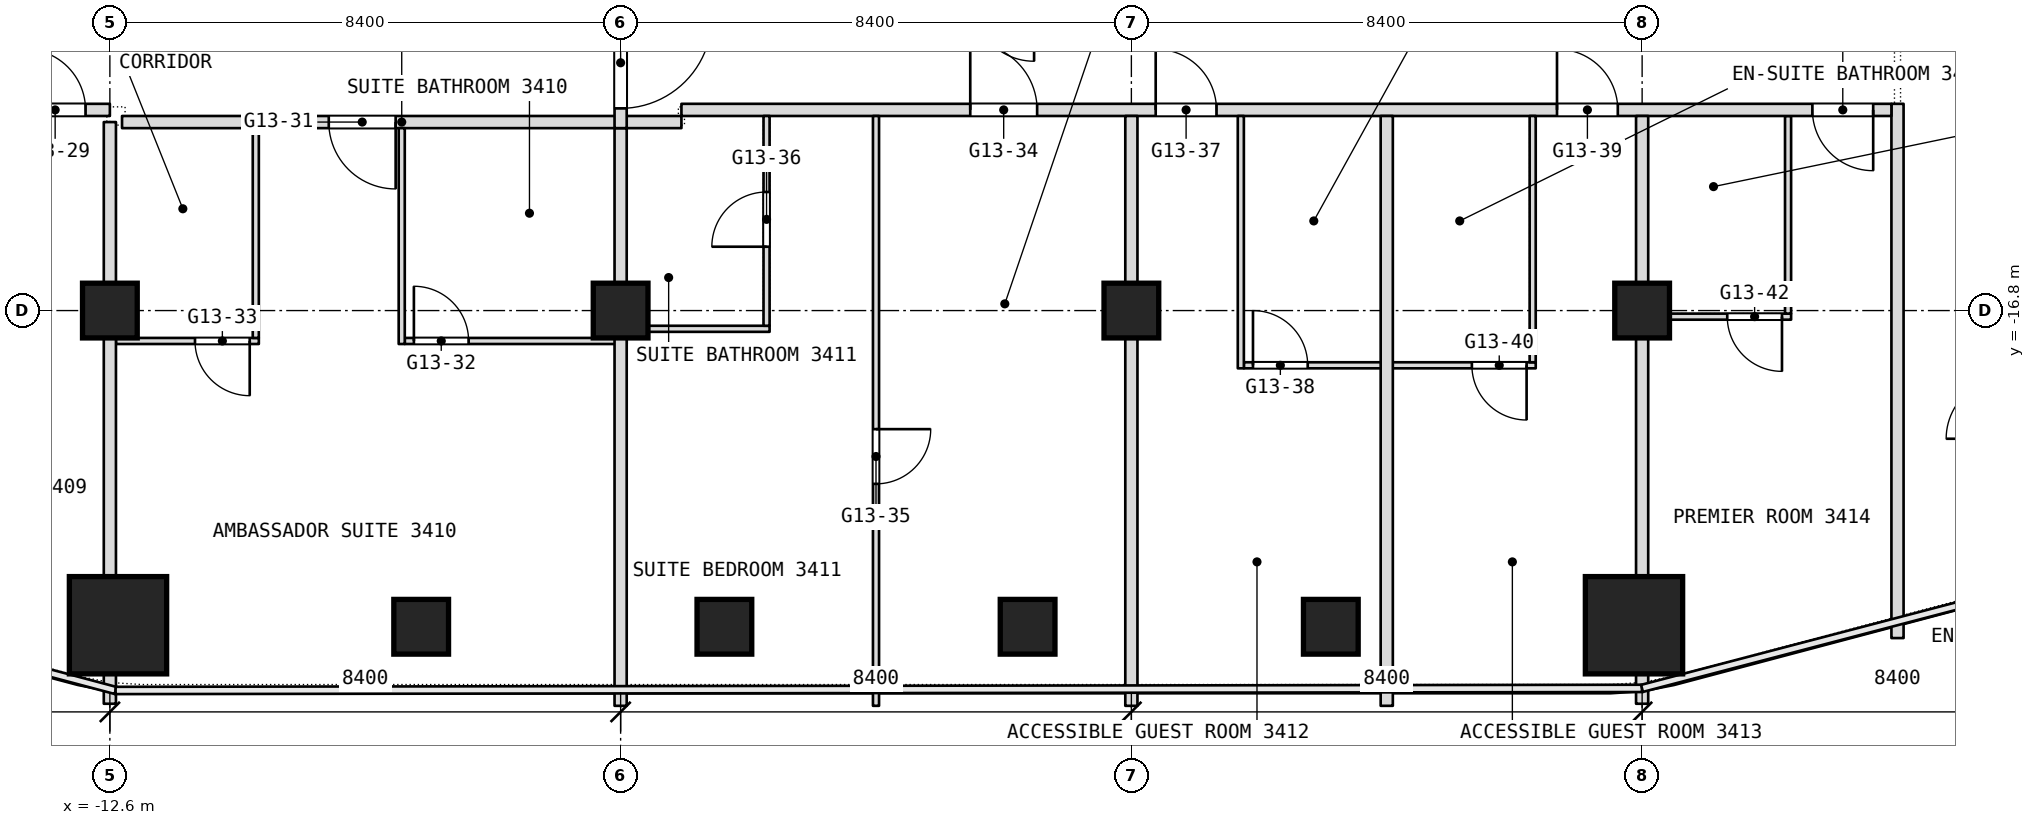
"""IFC4 building model, lengths in metres.
Left out: names, types, materials, properties, quantities, classifications, styles, units other than length and angle.
Written with IfcOpenShell. Run it as: python <this file> out.ifc"""

import sys

from ifc_helpers import new_model, si_unit, direction, frame, frame_2d, origin, origin_2d, place, context, subcontext, project, spatial, rectangle, extrude, element, fill, save


model = new_model("IFC4")
c1 = context("Model", 3, precision=1e-05, world=origin(), true_north=direction((0.0, 1.0)))
c2 = subcontext(c1, "Body", "Model", "MODEL_VIEW")
j1 = project(units=[si_unit("LENGTHUNIT", "METRE"), si_unit("PLANEANGLEUNIT", "RADIAN")], contexts=[c1])
p1 = place(None, origin())
s1 = spatial("IfcSite", under=j1, at=p1, CompositionType="ELEMENT")
p2 = place(p1, origin())
s2 = spatial("IfcBuilding", under=s1, at=p2, CompositionType="ELEMENT")
p3 = place(p2, frame((0.0, 0.0, 148.1)))
s3 = spatial("IfcBuildingStorey", under=s2, at=p3, CompositionType="ELEMENT", Elevation=148.1)
for number, where, z_axis, x_axis in (
    (1, (-12.466, -21.975, 0.0), (0.0, 0.0, 1.0), (1.0, 0.0, 0.0)),
    (2, (12.466, -21.975, 0.0), (0.0, 0.0, 1.0), (1.0, 0.0, 0.0)),
):
    element("IfcColumn", number, at=place(p3, frame(where, z_axis=z_axis, x_axis=x_axis)), inside=s3, PredefinedType="COLUMN", context=c2, shape_type="SweptSolid", body=[
        extrude(rectangle(XDim=1.6, YDim=1.6, at=origin_2d()), origin(), (0.0, 0.0, 1.0), 3.6),
    ])
for number, where, z_axis, x_axis in (
    (3, (-12.6, -16.8, 0.0), (0.0, 0.0, 1.0), (1.0, 0.0, 0.0)),
    (4, (-4.2, -16.8, 0.0), (0.0, 0.0, 1.0), (1.0, 0.0, 0.0)),
    (5, (4.2, -16.8, 0.0), (0.0, 0.0, 1.0), (1.0, 0.0, 0.0)),
    (6, (12.6, -16.8, 0.0), (0.0, 0.0, 1.0), (1.0, 0.0, 0.0)),
    (7, (7.48, -22.0, 0.0), (0.0, 0.0, 1.0), (1.0, 0.0, 0.0)),
    (8, (2.493, -22.0, 0.0), (0.0, 0.0, 1.0), (1.0, 0.0, 0.0)),
    (9, (-2.493, -22.0, 0.0), (0.0, 0.0, 1.0), (1.0, 0.0, 0.0)),
    (10, (-7.48, -22.0, 0.0), (0.0, 0.0, 1.0), (1.0, 0.0, 0.0)),
):
    element("IfcColumn", number, at=place(p3, frame(where, z_axis=z_axis, x_axis=x_axis)), inside=s3, PredefinedType="COLUMN", context=c2, shape_type="SweptSolid", body=[
        extrude(rectangle(XDim=0.9, YDim=0.9, at=origin_2d()), origin(), (0.0, 0.0, 1.0), 3.6),
    ])
p4 = place(p3, frame((6.05, -17.7, 0.0), z_axis=(0.0, 0.0, 1.0), x_axis=(1.0, 0.0, 0.0)))
e11 = element("IfcWall", 11, at=p4, inside=s3, PredefinedType="PARTITIONING", context=c2, shape_type="SweptSolid", body=[
    extrude(rectangle(XDim=4.8, YDim=0.1, at=frame_2d((2.4, 0.0))), origin(), (0.0, 0.0, 1.0), 3.34),
])
p5 = place(p4, frame((0.15, 0.0, 0.0)))
e12 = element("IfcOpeningElement", 12, at=p5, cuts=e11, PredefinedType="OPENING", context=c2, shape_type="SweptSolid", body=[
    extrude(rectangle(XDim=0.9, YDim=2.1, at=frame_2d((0.45, 1.05))), frame((0.0, 0.05, 0.0), z_axis=(0.0, -1.0, 0.0), x_axis=(1.0, 0.0, 0.0)), (0.0, 0.0, 1.0), 0.1),
])
p6 = place(p4, frame((3.75, 0.0, 0.0)))
e13 = element("IfcOpeningElement", 13, at=p6, cuts=e11, PredefinedType="OPENING", context=c2, shape_type="SweptSolid", body=[
    extrude(rectangle(XDim=0.9, YDim=2.1, at=frame_2d((0.45, 1.05))), frame((0.0, 0.05, 0.0), z_axis=(0.0, -1.0, 0.0), x_axis=(1.0, 0.0, 0.0)), (0.0, 0.0, 1.0), 0.1),
])
p7 = place(p3, frame((-12.5, -17.3, 0.0), z_axis=(0.0, 0.0, 1.0), x_axis=(1.0, 0.0, 0.0)))
e14 = element("IfcWall", 14, at=p7, inside=s3, PredefinedType="PARTITIONING", context=c2, shape_type="SweptSolid", body=[
    extrude(rectangle(XDim=2.35, YDim=0.1, at=frame_2d((1.175, 0.0))), origin(), (0.0, 0.0, 1.0), 3.34),
])
p8 = place(p7, frame((1.3, 0.0, 0.0)))
e15 = element("IfcOpeningElement", 15, at=p8, cuts=e14, PredefinedType="OPENING", context=c2, shape_type="SweptSolid", body=[
    extrude(rectangle(XDim=0.9, YDim=2.1, at=frame_2d((0.45, 1.05))), frame((0.0, 0.05, 0.0), z_axis=(0.0, -1.0, 0.0), x_axis=(1.0, 0.0, 0.0)), (0.0, 0.0, 1.0), 0.1),
])
p9 = place(p3, frame((-7.75, -17.3, 0.0), z_axis=(0.0, 0.0, 1.0), x_axis=(1.0, 0.0, 0.0)))
e16 = element("IfcWall", 16, at=p9, inside=s3, PredefinedType="PARTITIONING", context=c2, shape_type="SweptSolid", body=[
    extrude(rectangle(XDim=3.65, YDim=0.1, at=frame_2d((1.825, 0.0))), origin(), (0.0, 0.0, 1.0), 3.34),
])
p10 = place(p9, frame((0.15, 0.0, 0.0)))
e17 = element("IfcOpeningElement", 17, at=p10, cuts=e16, PredefinedType="OPENING", context=c2, shape_type="SweptSolid", body=[
    extrude(rectangle(XDim=0.9, YDim=2.1, at=frame_2d((0.45, 1.05))), frame((0.0, 0.05, 0.0), z_axis=(0.0, -1.0, 0.0), x_axis=(1.0, 0.0, 0.0)), (0.0, 0.0, 1.0), 0.1),
])
p11 = place(p3, frame((-4.1, -17.1, 0.0), z_axis=(0.0, 0.0, 1.0), x_axis=(1.0, 0.0, 0.0)))
e18 = element("IfcWall", 18, at=p11, inside=s3, PredefinedType="PARTITIONING", context=c2, shape_type="SweptSolid", body=[
    extrude(rectangle(XDim=2.35, YDim=0.1, at=frame_2d((1.175, 0.0))), origin(), (0.0, 0.0, 1.0), 3.34),
])
p12 = place(p3, frame((12.7, -16.9, 0.0), z_axis=(0.0, 0.0, 1.0), x_axis=(1.0, 0.0, 0.0)))
e19 = element("IfcWall", 19, at=p12, inside=s3, PredefinedType="PARTITIONING", context=c2, shape_type="SweptSolid", body=[
    extrude(rectangle(XDim=2.35, YDim=0.1, at=frame_2d((1.175, 0.0))), origin(), (0.0, 0.0, 1.0), 2.89),
])
p13 = place(p12, frame((1.3, 0.0, 0.0)))
e20 = element("IfcOpeningElement", 20, at=p13, cuts=e19, PredefinedType="OPENING", context=c2, shape_type="SweptSolid", body=[
    extrude(rectangle(XDim=0.9, YDim=2.1, at=frame_2d((0.45, 1.05))), frame((0.0, 0.05, 0.0), z_axis=(0.0, -1.0, 0.0), x_axis=(1.0, 0.0, 0.0)), (0.0, 0.0, 1.0), 0.1),
])
p14 = place(p3, frame((16.8, -22.186, 0.0), z_axis=(0.0, 0.0, 1.0), x_axis=(0.0, 1.0, 0.0)))
e21 = element("IfcWall", 21, at=p14, inside=s3, PredefinedType="PARTITIONING", context=c2, shape_type="SweptSolid", body=[
    extrude(rectangle(XDim=8.786, YDim=0.2, at=frame_2d((4.393, 0.0))), origin(), (0.0, 0.0, 1.0), 3.34),
])
p15 = place(p3, frame((15.0, -16.85, 0.0), z_axis=(0.0, 0.0, 1.0), x_axis=(0.0, 1.0, 0.0)))
e22 = element("IfcWall", 22, at=p15, inside=s3, PredefinedType="PARTITIONING", context=c2, shape_type="SweptSolid", body=[
    extrude(rectangle(XDim=3.25, YDim=0.1, at=frame_2d((1.625, 0.0))), origin(), (0.0, 0.0, 1.0), 3.34),
])
p16 = place(p3, frame((-12.4, -13.7, 0.0), z_axis=(0.0, 0.0, 1.0), x_axis=(1.0, 0.0, 0.0)))
e23 = element("IfcWall", 23, at=p16, inside=s3, PredefinedType="PARTITIONING", context=c2, shape_type="SweptSolid", body=[
    extrude(rectangle(XDim=9.2, YDim=0.2, at=frame_2d((4.6, 0.0))), origin(), (0.0, 0.0, 1.0), 3.34),
])
p17 = place(p16, frame((3.4, 0.0, 0.0)))
e24 = element("IfcOpeningElement", 24, at=p17, cuts=e23, PredefinedType="OPENING", context=c2, shape_type="SweptSolid", body=[
    extrude(rectangle(XDim=1.1, YDim=2.1, at=frame_2d((0.55, 1.05))), frame((0.0, 0.1, 0.0), z_axis=(0.0, -1.0, 0.0), x_axis=(1.0, 0.0, 0.0)), (0.0, 0.0, 1.0), 0.2),
])
p18 = place(p3, frame((-16.7, -13.5, 0.0), z_axis=(0.0, 0.0, 1.0), x_axis=(1.0, 0.0, 0.0)))
e25 = element("IfcWall", 25, at=p18, inside=s3, PredefinedType="PARTITIONING", context=c2, shape_type="SweptSolid", body=[
    extrude(rectangle(XDim=4.1, YDim=0.2, at=frame_2d((2.05, 0.0))), origin(), (0.0, 0.0, 1.0), 3.34),
])
p19 = place(p18, frame((2.7, 0.0, 0.0)))
e26 = element("IfcOpeningElement", 26, at=p19, cuts=e25, PredefinedType="OPENING", context=c2, shape_type="SweptSolid", body=[
    extrude(rectangle(XDim=1.0, YDim=2.1, at=frame_2d((0.5, 1.05))), frame((0.0, 0.1, 0.0), z_axis=(0.0, -1.0, 0.0), x_axis=(1.0, 0.0, 0.0)), (0.0, 0.0, 1.0), 0.2),
])
p20 = place(p3, frame((-3.2, -13.5, 0.0), z_axis=(0.0, 0.0, 1.0), x_axis=(1.0, 0.0, 0.0)))
e27 = element("IfcWall", 27, at=p20, inside=s3, PredefinedType="PARTITIONING", context=c2, shape_type="SweptSolid", body=[
    extrude(rectangle(XDim=19.9, YDim=0.2, at=frame_2d((9.95, 0.0))), origin(), (0.0, 0.0, 1.0), 3.34),
])
p21 = place(p20, frame((4.75, 0.0, 0.0)))
e28 = element("IfcOpeningElement", 28, at=p21, cuts=e27, PredefinedType="OPENING", context=c2, shape_type="SweptSolid", body=[
    extrude(rectangle(XDim=1.1, YDim=2.1, at=frame_2d((0.55, 1.05))), frame((0.0, 0.1, 0.0), z_axis=(0.0, -1.0, 0.0), x_axis=(1.0, 0.0, 0.0)), (0.0, 0.0, 1.0), 0.2),
])
p22 = place(p20, frame((7.8, 0.0, 0.0)))
e29 = element("IfcOpeningElement", 29, at=p22, cuts=e27, PredefinedType="OPENING", context=c2, shape_type="SweptSolid", body=[
    extrude(rectangle(XDim=1.0, YDim=2.1, at=frame_2d((0.5, 1.05))), frame((0.0, 0.1, 0.0), z_axis=(0.0, -1.0, 0.0), x_axis=(1.0, 0.0, 0.0)), (0.0, 0.0, 1.0), 0.2),
])
p23 = place(p20, frame((14.4, 0.0, 0.0)))
e30 = element("IfcOpeningElement", 30, at=p23, cuts=e27, PredefinedType="OPENING", context=c2, shape_type="SweptSolid", body=[
    extrude(rectangle(XDim=1.0, YDim=2.1, at=frame_2d((0.5, 1.05))), frame((0.0, 0.1, 0.0), z_axis=(0.0, -1.0, 0.0), x_axis=(1.0, 0.0, 0.0)), (0.0, 0.0, 1.0), 0.2),
])
p24 = place(p20, frame((18.6, 0.0, 0.0)))
e31 = element("IfcOpeningElement", 31, at=p24, cuts=e27, PredefinedType="OPENING", context=c2, shape_type="SweptSolid", body=[
    extrude(rectangle(XDim=1.0, YDim=2.1, at=frame_2d((0.5, 1.05))), frame((0.0, 0.1, 0.0), z_axis=(0.0, -1.0, 0.0), x_axis=(1.0, 0.0, 0.0)), (0.0, 0.0, 1.0), 0.2),
])
p25 = place(p3, frame((12.6, -23.266, 0.0), z_axis=(0.0, 0.0, 1.0), x_axis=(0.0, 1.0, 0.0)))
e32 = element("IfcWall", 32, at=p25, inside=s3, PredefinedType="PARTITIONING", context=c2, shape_type="SweptSolid", body=[
    extrude(rectangle(XDim=0.491, YDim=0.2, at=frame_2d((0.246, 0.0))), origin(), (0.0, 0.0, 1.0), 3.34),
])
p26 = place(p3, frame((12.6, -21.175, 0.0), z_axis=(0.0, 0.0, 1.0), x_axis=(0.0, 1.0, 0.0)))
e33 = element("IfcWall", 33, at=p26, inside=s3, PredefinedType="PARTITIONING", context=c2, shape_type="SweptSolid", body=[
    extrude(rectangle(XDim=7.575, YDim=0.2, at=frame_2d((3.788, 0.0))), origin(), (0.0, 0.0, 1.0), 3.34),
])
p27 = place(p3, frame((10.8, -17.65, 0.0), z_axis=(0.0, 0.0, 1.0), x_axis=(0.0, 1.0, 0.0)))
e34 = element("IfcWall", 34, at=p27, inside=s3, PredefinedType="PARTITIONING", context=c2, shape_type="SweptSolid", body=[
    extrude(rectangle(XDim=4.05, YDim=0.1, at=frame_2d((2.025, 0.0))), origin(), (0.0, 0.0, 1.0), 3.34),
])
p28 = place(p3, frame((8.4, -23.3, 0.0), z_axis=(0.0, 0.0, 1.0), x_axis=(0.0, 1.0, 0.0)))
e35 = element("IfcWall", 35, at=p28, inside=s3, PredefinedType="PARTITIONING", context=c2, shape_type="SweptSolid", body=[
    extrude(rectangle(XDim=9.7, YDim=0.2, at=frame_2d((4.85, 0.0))), origin(), (0.0, 0.0, 1.0), 3.34),
])
p29 = place(p3, frame((6.0, -17.75, 0.0), z_axis=(0.0, 0.0, 1.0), x_axis=(0.0, 1.0, 0.0)))
e36 = element("IfcWall", 36, at=p29, inside=s3, PredefinedType="PARTITIONING", context=c2, shape_type="SweptSolid", body=[
    extrude(rectangle(XDim=4.15, YDim=0.1, at=frame_2d((2.075, 0.0))), origin(), (0.0, 0.0, 1.0), 3.34),
])
p30 = place(p3, frame((4.2, -23.3, 0.0), z_axis=(0.0, 0.0, 1.0), x_axis=(0.0, 1.0, 0.0)))
e37 = element("IfcWall", 37, at=p30, inside=s3, PredefinedType="PARTITIONING", context=c2, shape_type="SweptSolid", body=[
    extrude(rectangle(XDim=9.7, YDim=0.2, at=frame_2d((4.85, 0.0))), origin(), (0.0, 0.0, 1.0), 3.34),
])
p31 = place(p3, frame((0.0, -23.3, 0.0), z_axis=(0.0, 0.0, 1.0), x_axis=(0.0, 1.0, 0.0)))
e38 = element("IfcWall", 38, at=p31, inside=s3, PredefinedType="PARTITIONING", context=c2, shape_type="SweptSolid", body=[
    extrude(rectangle(XDim=9.7, YDim=0.1, at=frame_2d((4.85, 0.0))), origin(), (0.0, 0.0, 1.0), 3.34),
])
p32 = place(p31, frame((3.65, 0.0, 0.0)))
e39 = element("IfcOpeningElement", 39, at=p32, cuts=e38, PredefinedType="OPENING", context=c2, shape_type="SweptSolid", body=[
    extrude(rectangle(XDim=0.9, YDim=2.1, at=frame_2d((0.45, 1.05))), frame((0.0, 0.05, 0.0), z_axis=(0.0, -1.0, 0.0), x_axis=(1.0, 0.0, 0.0)), (0.0, 0.0, 1.0), 0.1),
])
p33 = place(p3, frame((-1.8, -17.05, 0.0), z_axis=(0.0, 0.0, 1.0), x_axis=(0.0, 1.0, 0.0)))
e40 = element("IfcWall", 40, at=p33, inside=s3, PredefinedType="PARTITIONING", context=c2, shape_type="SweptSolid", body=[
    extrude(rectangle(XDim=3.45, YDim=0.1, at=frame_2d((1.725, 0.0))), origin(), (0.0, 0.0, 1.0), 3.34),
])
p34 = place(p33, frame((1.3, 0.0, 0.0)))
e41 = element("IfcOpeningElement", 41, at=p34, cuts=e40, PredefinedType="OPENING", context=c2, shape_type="SweptSolid", body=[
    extrude(rectangle(XDim=0.9, YDim=2.1, at=frame_2d((0.45, 1.05))), frame((0.0, 0.05, 0.0), z_axis=(0.0, -1.0, 0.0), x_axis=(1.0, 0.0, 0.0)), (0.0, 0.0, 1.0), 0.1),
])
p35 = place(p3, frame((-4.2, -23.3, 0.0), z_axis=(0.0, 0.0, 1.0), x_axis=(0.0, 1.0, 0.0)))
e42 = element("IfcWall", 42, at=p35, inside=s3, PredefinedType="PARTITIONING", context=c2, shape_type="SweptSolid", body=[
    extrude(rectangle(XDim=9.5, YDim=0.2, at=frame_2d((4.75, 0.0))), origin(), (0.0, 0.0, 1.0), 3.34),
])
p36 = place(p3, frame((-4.2, -13.8, 0.0), z_axis=(0.0, 0.0, 1.0), x_axis=(0.0, 1.0, 0.0)))
e43 = element("IfcWall", 43, at=p36, inside=s3, PredefinedType="PARTITIONING", context=c2, shape_type="SweptSolid", body=[
    extrude(rectangle(XDim=13.8, YDim=0.2, at=frame_2d((6.9, 0.0))), origin(), (0.0, 0.0, 1.0), 3.34),
])
p37 = place(p36, frame((12.15, 0.0, 0.0)))
e44 = element("IfcOpeningElement", 44, at=p37, cuts=e43, PredefinedType="OPENING", context=c2, shape_type="SweptSolid", body=[
    extrude(rectangle(XDim=1.5, YDim=2.1, at=frame_2d((0.75, 1.05))), frame((0.0, 0.1, 0.0), z_axis=(0.0, -1.0, 0.0), x_axis=(1.0, 0.0, 0.0)), (0.0, 0.0, 1.0), 0.2),
])
p38 = place(p36, frame((0.325, 0.0, 0.0)))
e45 = element("IfcOpeningElement", 45, at=p38, cuts=e43, PredefinedType="OPENING", context=c2, shape_type="SweptSolid", body=[
    extrude(rectangle(XDim=1.5, YDim=2.1, at=frame_2d((0.75, 1.05))), frame((0.0, 0.1, 0.0), z_axis=(0.0, -1.0, 0.0), x_axis=(1.0, 0.0, 0.0)), (0.0, 0.0, 1.0), 0.2),
])
p39 = place(p3, frame((-7.8, -17.35, 0.0), z_axis=(0.0, 0.0, 1.0), x_axis=(0.0, 1.0, 0.0)))
e46 = element("IfcWall", 46, at=p39, inside=s3, PredefinedType="PARTITIONING", context=c2, shape_type="SweptSolid", body=[
    extrude(rectangle(XDim=3.55, YDim=0.1, at=frame_2d((1.775, 0.0))), origin(), (0.0, 0.0, 1.0), 3.34),
])
p40 = place(p3, frame((-10.2, -17.25, 0.0), z_axis=(0.0, 0.0, 1.0), x_axis=(0.0, 1.0, 0.0)))
e47 = element("IfcWall", 47, at=p40, inside=s3, PredefinedType="PARTITIONING", context=c2, shape_type="SweptSolid", body=[
    extrude(rectangle(XDim=3.45, YDim=0.1, at=frame_2d((1.725, 0.0))), origin(), (0.0, 0.0, 1.0), 3.34),
])
p41 = place(p3, frame((-12.6, -23.266, 0.0), z_axis=(0.0, 0.0, 1.0), x_axis=(0.0, 1.0, 0.0)))
e48 = element("IfcWall", 48, at=p41, inside=s3, PredefinedType="PARTITIONING", context=c2, shape_type="SweptSolid", body=[
    extrude(rectangle(XDim=0.491, YDim=0.2, at=frame_2d((0.246, 0.0))), origin(), (0.0, 0.0, 1.0), 3.34),
])
p42 = place(p3, frame((-12.6, -21.175, 0.0), z_axis=(0.0, 0.0, 1.0), x_axis=(0.0, 1.0, 0.0)))
e49 = element("IfcWall", 49, at=p42, inside=s3, PredefinedType="PARTITIONING", context=c2, shape_type="SweptSolid", body=[
    extrude(rectangle(XDim=7.475, YDim=0.2, at=frame_2d((3.738, 0.0))), origin(), (0.0, 0.0, 1.0), 3.34),
])
p43 = place(p5, origin())
e50 = element("IfcDoor", 50, at=p43, inside=s3, OperationType="SINGLE_SWING_LEFT", PredefinedType="DOOR", context=c2, shape_type="SweptSolid", body=[
    extrude(rectangle(XDim=0.9, YDim=2.1, at=frame_2d((0.45, 1.05))), frame((0.0, 0.025, 0.0), z_axis=(0.0, -1.0, 0.0), x_axis=(1.0, 0.0, 0.0)), (0.0, 0.0, 1.0), 0.05),
])
fill(e12, e50)
p44 = place(p6, origin())
e51 = element("IfcDoor", 51, at=p44, inside=s3, OperationType="SINGLE_SWING_RIGHT", PredefinedType="DOOR", context=c2, shape_type="SweptSolid", body=[
    extrude(rectangle(XDim=0.9, YDim=2.1, at=frame_2d((0.45, 1.05))), frame((0.0, 0.025, 0.0), z_axis=(0.0, -1.0, 0.0), x_axis=(1.0, 0.0, 0.0)), (0.0, 0.0, 1.0), 0.05),
])
fill(e13, e51)
p45 = place(p8, origin())
e52 = element("IfcDoor", 52, at=p45, inside=s3, OperationType="SINGLE_SWING_RIGHT", PredefinedType="DOOR", context=c2, shape_type="SweptSolid", body=[
    extrude(rectangle(XDim=0.9, YDim=2.1, at=frame_2d((0.45, 1.05))), frame((0.0, 0.025, 0.0), z_axis=(0.0, -1.0, 0.0), x_axis=(1.0, 0.0, 0.0)), (0.0, 0.0, 1.0), 0.05),
])
fill(e15, e52)
p46 = place(p10, origin())
e53 = element("IfcDoor", 53, at=p46, inside=s3, OperationType="SINGLE_SWING_LEFT", PredefinedType="DOOR", context=c2, shape_type="SweptSolid", body=[
    extrude(rectangle(XDim=0.9, YDim=2.1, at=frame_2d((0.45, 1.05))), frame((0.0, 0.025, 0.0), z_axis=(0.0, -1.0, 0.0), x_axis=(1.0, 0.0, 0.0)), (0.0, 0.0, 1.0), 0.05),
])
fill(e17, e53)
p47 = place(p13, origin())
e54 = element("IfcDoor", 54, at=p47, inside=s3, OperationType="SINGLE_SWING_RIGHT", PredefinedType="DOOR", context=c2, shape_type="SweptSolid", body=[
    extrude(rectangle(XDim=0.9, YDim=2.1, at=frame_2d((0.45, 1.05))), frame((0.0, 0.025, 0.0), z_axis=(0.0, -1.0, 0.0), x_axis=(1.0, 0.0, 0.0)), (0.0, 0.0, 1.0), 0.05),
])
fill(e20, e54)
p48 = place(p17, origin())
e55 = element("IfcDoor", 55, at=p48, inside=s3, OperationType="SINGLE_SWING_LEFT", PredefinedType="DOOR", context=c2, shape_type="SweptSolid", body=[
    extrude(rectangle(XDim=1.1, YDim=2.1, at=frame_2d((0.55, 1.05))), frame((0.0, 0.025, 0.0), z_axis=(0.0, -1.0, 0.0), x_axis=(1.0, 0.0, 0.0)), (0.0, 0.0, 1.0), 0.05),
])
fill(e24, e55)
p49 = place(p19, origin())
e56 = element("IfcDoor", 56, at=p49, inside=s3, OperationType="SINGLE_SWING_LEFT", PredefinedType="DOOR", context=c2, shape_type="SweptSolid", body=[
    extrude(rectangle(XDim=1.0, YDim=2.1, at=frame_2d((0.5, 1.05))), frame((0.0, 0.025, 0.0), z_axis=(0.0, -1.0, 0.0), x_axis=(1.0, 0.0, 0.0)), (0.0, 0.0, 1.0), 0.05),
])
fill(e26, e56)
p50 = place(p21, origin())
e57 = element("IfcDoor", 57, at=p50, inside=s3, OperationType="SINGLE_SWING_RIGHT", PredefinedType="DOOR", context=c2, shape_type="SweptSolid", body=[
    extrude(rectangle(XDim=1.1, YDim=2.1, at=frame_2d((0.55, 1.05))), frame((0.0, 0.025, 0.0), z_axis=(0.0, -1.0, 0.0), x_axis=(1.0, 0.0, 0.0)), (0.0, 0.0, 1.0), 0.05),
])
fill(e28, e57)
p51 = place(p22, origin())
e58 = element("IfcDoor", 58, at=p51, inside=s3, OperationType="SINGLE_SWING_LEFT", PredefinedType="DOOR", context=c2, shape_type="SweptSolid", body=[
    extrude(rectangle(XDim=1.0, YDim=2.1, at=frame_2d((0.5, 1.05))), frame((0.0, 0.025, 0.0), z_axis=(0.0, -1.0, 0.0), x_axis=(1.0, 0.0, 0.0)), (0.0, 0.0, 1.0), 0.05),
])
fill(e29, e58)
p52 = place(p23, origin())
e59 = element("IfcDoor", 59, at=p52, inside=s3, OperationType="SINGLE_SWING_LEFT", PredefinedType="DOOR", context=c2, shape_type="SweptSolid", body=[
    extrude(rectangle(XDim=1.0, YDim=2.1, at=frame_2d((0.5, 1.05))), frame((0.0, 0.025, 0.0), z_axis=(0.0, -1.0, 0.0), x_axis=(1.0, 0.0, 0.0)), (0.0, 0.0, 1.0), 0.05),
])
fill(e30, e59)
p53 = place(p24, origin())
e60 = element("IfcDoor", 60, at=p53, inside=s3, OperationType="SINGLE_SWING_LEFT", PredefinedType="DOOR", context=c2, shape_type="SweptSolid", body=[
    extrude(rectangle(XDim=1.0, YDim=2.1, at=frame_2d((0.5, 1.05))), frame((0.0, 0.025, 0.0), z_axis=(0.0, -1.0, 0.0), x_axis=(1.0, 0.0, 0.0)), (0.0, 0.0, 1.0), 0.05),
])
fill(e31, e60)
p54 = place(p32, origin())
e61 = element("IfcDoor", 61, at=p54, inside=s3, OperationType="SINGLE_SWING_RIGHT", PredefinedType="DOOR", context=c2, shape_type="SweptSolid", body=[
    extrude(rectangle(XDim=0.9, YDim=2.1, at=frame_2d((0.45, 1.05))), frame((0.0, 0.025, 0.0), z_axis=(0.0, -1.0, 0.0), x_axis=(1.0, 0.0, 0.0)), (0.0, 0.0, 1.0), 0.05),
])
fill(e39, e61)
p55 = place(p34, origin())
e62 = element("IfcDoor", 62, at=p55, inside=s3, OperationType="SINGLE_SWING_LEFT", PredefinedType="DOOR", context=c2, shape_type="SweptSolid", body=[
    extrude(rectangle(XDim=0.9, YDim=2.1, at=frame_2d((0.45, 1.05))), frame((0.0, 0.025, 0.0), z_axis=(0.0, -1.0, 0.0), x_axis=(1.0, 0.0, 0.0)), (0.0, 0.0, 1.0), 0.05),
])
fill(e41, e62)
p56 = place(p38, origin())
e63 = element("IfcDoor", 63, at=p56, inside=s3, OperationType="DOUBLE_DOOR_DOUBLE_SWING", PredefinedType="DOOR", context=c2, shape_type="SweptSolid", body=[
    extrude(rectangle(XDim=1.5, YDim=2.1, at=frame_2d((0.75, 1.05))), frame((0.0, 0.025, 0.0), z_axis=(0.0, -1.0, 0.0), x_axis=(1.0, 0.0, 0.0)), (0.0, 0.0, 1.0), 0.05),
])
fill(e45, e63)
save(model, sys.argv[1])
